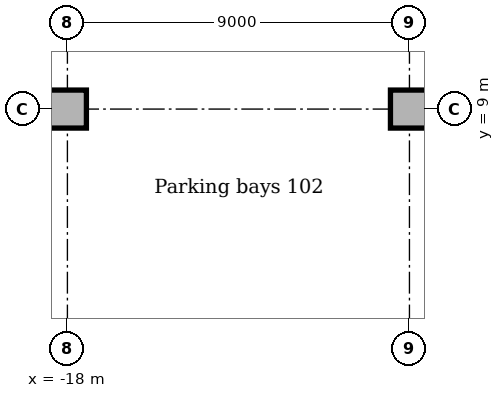
"""IFC4 building model, lengths in metres.
Left out: names, types, materials, properties, quantities, classifications, styles, units other than length and angle.
Written with IfcOpenShell. Run it as: python <this file> out.ifc"""

import sys

from ifc_helpers import new_model, si_unit, direction, frame, origin, origin_2d, place, context, subcontext, project, spatial, rectangle, extrude, element, save


model = new_model("IFC4")
c1 = context("Model", 3, precision=1e-05, world=origin(), true_north=direction((0.0, 1.0)))
c2 = subcontext(c1, "Body", "Model", "MODEL_VIEW")
j1 = project(units=[si_unit("LENGTHUNIT", "METRE"), si_unit("PLANEANGLEUNIT", "RADIAN")], contexts=[c1])
p1 = place(None, origin())
s1 = spatial("IfcSite", under=j1, at=p1, CompositionType="ELEMENT")
p2 = place(p1, origin())
s2 = spatial("IfcBuilding", under=s1, at=p2, CompositionType="ELEMENT")
p3 = place(p2, frame((0.0, 0.0, -5.0)))
s3 = spatial("IfcBuildingStorey", under=s2, at=p3, CompositionType="ELEMENT", Elevation=-5.0)
for number, where, z_axis, x_axis in (
    (1, (-18.0, 9.0, 0.0), (0.0, 0.0, 1.0), (1.0, 0.0, 0.0)),
    (2, (-9.0, 9.0, 0.0), (0.0, 0.0, 1.0), (1.0, 0.0, 0.0)),
):
    element("IfcColumn", number, at=place(p3, frame(where, z_axis=z_axis, x_axis=x_axis)), inside=s3, PredefinedType="COLUMN", context=c2, shape_type="SweptSolid", body=[
        extrude(rectangle(XDim=1.0, YDim=1.0, at=origin_2d()), origin(), (0.0, 0.0, 1.0), 4.7),
    ])
save(model, sys.argv[1])
